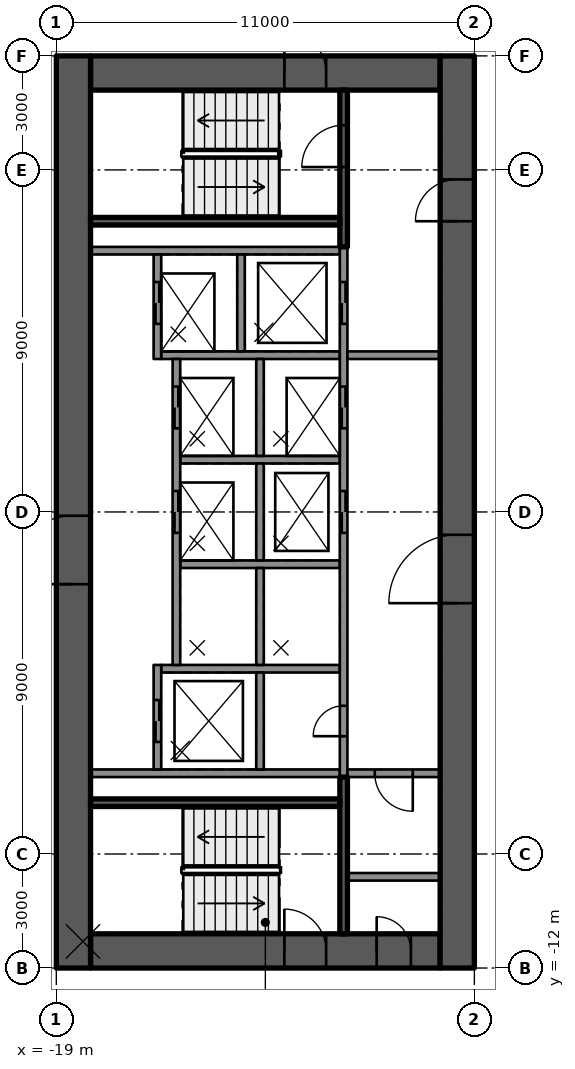
"""IFC4 building model, lengths in metres.
Left out: names, types, materials, properties, quantities, classifications, styles, units other than length and angle.
Written with IfcOpenShell. Run it as: python <this file> out.ifc"""

import sys

from ifc_helpers import new_model, si_unit, direction, frame, frame_2d, origin, place, context, subcontext, project, spatial, rectangle, extrude, element, fill, save


model = new_model("IFC4")
c1 = context("Model", 3, precision=1e-05, world=origin(), true_north=direction((0.0, 1.0)))
c2 = subcontext(c1, "Body", "Model", "MODEL_VIEW")
j1 = project(units=[si_unit("LENGTHUNIT", "METRE"), si_unit("PLANEANGLEUNIT", "RADIAN")], contexts=[c1])
p1 = place(None, origin())
s1 = spatial("IfcSite", under=j1, at=p1, CompositionType="ELEMENT")
p2 = place(p1, origin())
s2 = spatial("IfcBuilding", under=s1, at=p2, CompositionType="ELEMENT")
p3 = place(p2, frame((0.0, 0.0, 69.3)))
s3 = spatial("IfcBuildingStorey", under=s2, at=p3, CompositionType="ELEMENT", Elevation=69.3)
p4 = place(p3, frame((-18.1, 11.55, 0.0), z_axis=(0.0, 0.0, 1.0), x_axis=(1.0, 0.0, 0.0)))
e1 = element("IfcWall", 1, at=p4, inside=s3, PredefinedType="SHEAR", context=c2, shape_type="SweptSolid", body=[
    extrude(rectangle(XDim=9.2, YDim=0.9, at=frame_2d((4.6, 0.0))), origin(), (0.0, 0.0, 1.0), 3.5),
])
p5 = place(p4, frame((5.1, 0.0, 0.0)))
e2 = element("IfcOpeningElement", 2, at=p5, cuts=e1, PredefinedType="OPENING", context=c2, shape_type="SweptSolid", body=[
    extrude(rectangle(XDim=1.1, YDim=2.1, at=frame_2d((0.55, 1.05))), frame((0.0, 0.46, 0.0), z_axis=(0.0, -1.0, 0.0), x_axis=(1.0, 0.0, 0.0)), (0.0, 0.0, 1.0), 0.92),
])
p6 = place(p3, frame((-18.1, -11.55, 0.0), z_axis=(0.0, 0.0, 1.0), x_axis=(1.0, 0.0, 0.0)))
e3 = element("IfcWall", 3, at=p6, inside=s3, PredefinedType="SHEAR", context=c2, shape_type="SweptSolid", body=[
    extrude(rectangle(XDim=9.2, YDim=0.9, at=frame_2d((4.6, 0.0))), origin(), (0.0, 0.0, 1.0), 3.5),
])
p7 = place(p6, frame((5.1, 0.0, 0.0)))
e4 = element("IfcOpeningElement", 4, at=p7, cuts=e3, PredefinedType="OPENING", context=c2, shape_type="SweptSolid", body=[
    extrude(rectangle(XDim=1.1, YDim=2.1, at=frame_2d((0.55, 1.05))), frame((0.0, 0.46, 0.0), z_axis=(0.0, -1.0, 0.0), x_axis=(1.0, 0.0, 0.0)), (0.0, 0.0, 1.0), 0.92),
])
p8 = place(p6, frame((7.53, 0.0, 0.0)))
e5 = element("IfcOpeningElement", 5, at=p8, cuts=e3, PredefinedType="OPENING", context=c2, shape_type="SweptSolid", body=[
    extrude(rectangle(XDim=0.9, YDim=2.1, at=frame_2d((0.45, 1.05))), frame((0.0, 0.46, 0.0), z_axis=(0.0, -1.0, 0.0), x_axis=(1.0, 0.0, 0.0)), (0.0, 0.0, 1.0), 0.92),
])
p9 = place(p3, frame((-18.55, -12.0, 0.0), z_axis=(0.0, 0.0, 1.0), x_axis=(0.0, 1.0, 0.0)))
e6 = element("IfcWall", 6, at=p9, inside=s3, PredefinedType="SHEAR", context=c2, shape_type="SweptSolid", body=[
    extrude(rectangle(XDim=24.0, YDim=0.9, at=frame_2d((12.0, 0.0))), origin(), (0.0, 0.0, 1.0), 3.5),
])
p10 = place(p9, frame((10.1, 0.0, 0.0)))
e7 = element("IfcOpeningElement", 7, at=p10, cuts=e6, PredefinedType="OPENING", context=c2, shape_type="SweptSolid", body=[
    extrude(rectangle(XDim=1.8, YDim=2.1, at=frame_2d((0.9, 1.05))), frame((0.0, 0.46, 0.0), z_axis=(0.0, -1.0, 0.0), x_axis=(1.0, 0.0, 0.0)), (0.0, 0.0, 1.0), 0.92),
])
p11 = place(p3, frame((-8.45, -12.0, 0.0), z_axis=(0.0, 0.0, 1.0), x_axis=(0.0, 1.0, 0.0)))
e8 = element("IfcWall", 8, at=p11, inside=s3, PredefinedType="SHEAR", context=c2, shape_type="SweptSolid", body=[
    extrude(rectangle(XDim=24.0, YDim=0.9, at=frame_2d((12.0, 0.0))), origin(), (0.0, 0.0, 1.0), 3.5),
])
p12 = place(p11, frame((9.6, 0.0, 0.0)))
e9 = element("IfcOpeningElement", 9, at=p12, cuts=e8, PredefinedType="OPENING", context=c2, shape_type="SweptSolid", body=[
    extrude(rectangle(XDim=1.8, YDim=2.1, at=frame_2d((0.9, 1.05))), frame((0.0, 0.46, 0.0), z_axis=(0.0, -1.0, 0.0), x_axis=(1.0, 0.0, 0.0)), (0.0, 0.0, 1.0), 0.92),
])
p13 = place(p11, frame((19.65, 0.0, 0.0)))
e10 = element("IfcOpeningElement", 10, at=p13, cuts=e8, PredefinedType="OPENING", context=c2, shape_type="SweptSolid", body=[
    extrude(rectangle(XDim=1.1, YDim=2.1, at=frame_2d((0.55, 1.05))), frame((0.0, 0.46, 0.0), z_axis=(0.0, -1.0, 0.0), x_axis=(1.0, 0.0, 0.0)), (0.0, 0.0, 1.0), 0.92),
])
for number, where, z_axis, x_axis in (
    (11, (-11.54, 6.875, 0.0), (0.0, 0.0, 1.0), (-1.0, 0.0, 0.0)),
    (12, (-11.54, -6.875, 0.0), (0.0, 0.0, 1.0), (-1.0, 0.0, 0.0)),
):
    element("IfcWall", number, at=place(p3, frame(where, z_axis=z_axis, x_axis=x_axis)), inside=s3, PredefinedType="SOLIDWALL", context=c2, shape_type="SweptSolid", body=[
        extrude(rectangle(XDim=6.56, YDim=0.2, at=frame_2d((3.28, 0.0))), origin(), (0.0, 0.0, 1.0), 3.09),
    ])
p14 = place(p3, frame((-11.54, -4.125, 0.0), z_axis=(0.0, 0.0, 1.0), x_axis=(-1.0, 0.0, 0.0)))
e13 = element("IfcWall", 13, at=p14, inside=s3, PredefinedType="SOLIDWALL", context=c2, shape_type="SweptSolid", body=[
    extrude(rectangle(XDim=4.7, YDim=0.2, at=frame_2d((2.35, 0.0))), origin(), (0.0, 0.0, 1.0), 3.09),
])
for number, where, z_axis, x_axis in (
    (14, (-11.54, -1.375, 0.0), (0.0, 0.0, 1.0), (-1.0, 0.0, 0.0)),
    (15, (-11.54, 1.375, 0.0), (0.0, 0.0, 1.0), (-1.0, 0.0, 0.0)),
):
    element("IfcWall", number, at=place(p3, frame(where, z_axis=z_axis, x_axis=x_axis)), inside=s3, PredefinedType="SOLIDWALL", context=c2, shape_type="SweptSolid", body=[
        extrude(rectangle(XDim=4.2, YDim=0.2, at=frame_2d((2.1, 0.0))), origin(), (0.0, 0.0, 1.0), 3.09),
    ])
p15 = place(p3, frame((-11.54, 4.125, 0.0), z_axis=(0.0, 0.0, 1.0), x_axis=(-1.0, 0.0, 0.0)))
e16 = element("IfcWall", 16, at=p15, inside=s3, PredefinedType="SOLIDWALL", context=c2, shape_type="SweptSolid", body=[
    extrude(rectangle(XDim=4.7, YDim=0.2, at=frame_2d((2.35, 0.0))), origin(), (0.0, 0.0, 1.0), 3.09),
])
p16 = place(p3, frame((-11.44, -6.975, 0.0), z_axis=(0.0, 0.0, 1.0), x_axis=(0.0, 1.0, 0.0)))
e17 = element("IfcWall", 17, at=p16, inside=s3, PredefinedType="SOLIDWALL", context=c2, shape_type="SweptSolid", body=[
    extrude(rectangle(XDim=13.95, YDim=0.2, at=frame_2d((6.975, 0.0))), origin(), (0.0, 0.0, 1.0), 3.09),
])
p17 = place(p16, frame((6.425, 0.0, 0.0)))
e18 = element("IfcOpeningElement", 18, at=p17, cuts=e17, PredefinedType="OPENING", context=c2, shape_type="SweptSolid", body=[
    extrude(rectangle(XDim=1.1, YDim=2.1, at=frame_2d((0.55, 1.05))), frame((0.0, 0.11, 0.0), z_axis=(0.0, -1.0, 0.0), x_axis=(1.0, 0.0, 0.0)), (0.0, 0.0, 1.0), 0.22),
])
p18 = place(p16, frame((9.175, 0.0, 0.0)))
e19 = element("IfcOpeningElement", 19, at=p18, cuts=e17, PredefinedType="OPENING", context=c2, shape_type="SweptSolid", body=[
    extrude(rectangle(XDim=1.1, YDim=2.1, at=frame_2d((0.55, 1.05))), frame((0.0, 0.11, 0.0), z_axis=(0.0, -1.0, 0.0), x_axis=(1.0, 0.0, 0.0)), (0.0, 0.0, 1.0), 0.22),
])
p19 = place(p16, frame((11.925, 0.0, 0.0)))
e20 = element("IfcOpeningElement", 20, at=p19, cuts=e17, PredefinedType="OPENING", context=c2, shape_type="SweptSolid", body=[
    extrude(rectangle(XDim=1.1, YDim=2.1, at=frame_2d((0.55, 1.05))), frame((0.0, 0.11, 0.0), z_axis=(0.0, -1.0, 0.0), x_axis=(1.0, 0.0, 0.0)), (0.0, 0.0, 1.0), 0.22),
])
p20 = place(p16, frame((1.075, 0.0, 0.0)))
e21 = element("IfcOpeningElement", 21, at=p20, cuts=e17, PredefinedType="OPENING", context=c2, shape_type="SweptSolid", body=[
    extrude(rectangle(XDim=0.8, YDim=2.1, at=frame_2d((0.4, 1.05))), frame((0.0, 0.11, 0.0), z_axis=(0.0, -1.0, 0.0), x_axis=(1.0, 0.0, 0.0)), (0.0, 0.0, 1.0), 0.22),
])
for number, where, z_axis, x_axis in (
    (22, (-13.64, -6.775, 0.0), (0.0, 0.0, 1.0), (0.0, 1.0, 0.0)),
    (23, (-13.64, -4.025, 0.0), (0.0, 0.0, 1.0), (0.0, 1.0, 0.0)),
    (24, (-13.64, -1.275, 0.0), (0.0, 0.0, 1.0), (0.0, 1.0, 0.0)),
    (25, (-13.64, 1.475, 0.0), (0.0, 0.0, 1.0), (0.0, 1.0, 0.0)),
    (26, (-14.14, 4.225, 0.0), (0.0, 0.0, 1.0), (0.0, 1.0, 0.0)),
):
    element("IfcWall", number, at=place(p3, frame(where, z_axis=z_axis, x_axis=x_axis)), inside=s3, PredefinedType="SOLIDWALL", context=c2, shape_type="SweptSolid", body=[
        extrude(rectangle(XDim=2.55, YDim=0.2, at=frame_2d((1.275, 0.0))), origin(), (0.0, 0.0, 1.0), 3.09),
    ])
p21 = place(p3, frame((-16.34, -6.775, 0.0), z_axis=(0.0, 0.0, 1.0), x_axis=(0.0, 1.0, 0.0)))
e27 = element("IfcWall", 27, at=p21, inside=s3, PredefinedType="SOLIDWALL", context=c2, shape_type="SweptSolid", body=[
    extrude(rectangle(XDim=2.75, YDim=0.2, at=frame_2d((1.375, 0.0))), origin(), (0.0, 0.0, 1.0), 3.09),
])
p22 = place(p21, frame((0.725, 0.0, 0.0)))
e28 = element("IfcOpeningElement", 28, at=p22, cuts=e27, PredefinedType="OPENING", context=c2, shape_type="SweptSolid", body=[
    extrude(rectangle(XDim=1.1, YDim=2.1, at=frame_2d((0.55, 1.05))), frame((0.0, 0.11, 0.0), z_axis=(0.0, -1.0, 0.0), x_axis=(1.0, 0.0, 0.0)), (0.0, 0.0, 1.0), 0.22),
])
p23 = place(p3, frame((-15.84, -4.025, 0.0), z_axis=(0.0, 0.0, 1.0), x_axis=(0.0, 1.0, 0.0)))
e29 = element("IfcWall", 29, at=p23, inside=s3, PredefinedType="SOLIDWALL", context=c2, shape_type="SweptSolid", body=[
    extrude(rectangle(XDim=8.05, YDim=0.2, at=frame_2d((4.025, 0.0))), origin(), (0.0, 0.0, 1.0), 3.09),
])
p24 = place(p23, frame((3.475, 0.0, 0.0)))
e30 = element("IfcOpeningElement", 30, at=p24, cuts=e29, PredefinedType="OPENING", context=c2, shape_type="SweptSolid", body=[
    extrude(rectangle(XDim=1.1, YDim=2.1, at=frame_2d((0.55, 1.05))), frame((0.0, 0.11, 0.0), z_axis=(0.0, -1.0, 0.0), x_axis=(1.0, 0.0, 0.0)), (0.0, 0.0, 1.0), 0.22),
])
p25 = place(p23, frame((6.225, 0.0, 0.0)))
e31 = element("IfcOpeningElement", 31, at=p25, cuts=e29, PredefinedType="OPENING", context=c2, shape_type="SweptSolid", body=[
    extrude(rectangle(XDim=1.1, YDim=2.1, at=frame_2d((0.55, 1.05))), frame((0.0, 0.11, 0.0), z_axis=(0.0, -1.0, 0.0), x_axis=(1.0, 0.0, 0.0)), (0.0, 0.0, 1.0), 0.22),
])
p26 = place(p3, frame((-16.34, 4.025, 0.0), z_axis=(0.0, 0.0, 1.0), x_axis=(0.0, 1.0, 0.0)))
e32 = element("IfcWall", 32, at=p26, inside=s3, PredefinedType="SOLIDWALL", context=c2, shape_type="SweptSolid", body=[
    extrude(rectangle(XDim=2.75, YDim=0.2, at=frame_2d((1.375, 0.0))), origin(), (0.0, 0.0, 1.0), 3.09),
])
p27 = place(p26, frame((0.925, 0.0, 0.0)))
e33 = element("IfcOpeningElement", 33, at=p27, cuts=e32, PredefinedType="OPENING", context=c2, shape_type="SweptSolid", body=[
    extrude(rectangle(XDim=1.1, YDim=2.1, at=frame_2d((0.55, 1.05))), frame((0.0, 0.11, 0.0), z_axis=(0.0, -1.0, 0.0), x_axis=(1.0, 0.0, 0.0)), (0.0, 0.0, 1.0), 0.22),
])
p28 = place(p3, frame((-11.44, 6.975, 0.0), z_axis=(0.0, 0.0, 1.0), x_axis=(0.0, 1.0, 0.0)))
e34 = element("IfcWall", 34, at=p28, inside=s3, PredefinedType="SOLIDWALL", context=c2, shape_type="SweptSolid", body=[
    extrude(rectangle(XDim=4.125, YDim=0.2, at=frame_2d((2.062, 0.0))), origin(), (0.0, 0.0, 1.0), 3.09),
])
p29 = place(p28, frame((2.1, 0.0, 0.0)))
e35 = element("IfcOpeningElement", 35, at=p29, cuts=e34, PredefinedType="OPENING", context=c2, shape_type="SweptSolid", body=[
    extrude(rectangle(XDim=1.1, YDim=2.1, at=frame_2d((0.55, 1.05))), frame((0.0, 0.11, 0.0), z_axis=(0.0, -1.0, 0.0), x_axis=(1.0, 0.0, 0.0)), (0.0, 0.0, 1.0), 0.22),
])
p30 = place(p3, frame((-11.54, 7.65, 0.0), z_axis=(0.0, 0.0, 1.0), x_axis=(-1.0, 0.0, 0.0)))
e36 = element("IfcWall", 36, at=p30, inside=s3, PredefinedType="SOLIDWALL", context=c2, shape_type="SweptSolid", body=[
    extrude(rectangle(XDim=6.56, YDim=0.2, at=frame_2d((3.28, 0.0))), origin(), (0.0, 0.0, 1.0), 3.09),
])
p31 = place(p3, frame((-11.44, -11.1, 0.0), z_axis=(0.0, 0.0, 1.0), x_axis=(0.0, 1.0, 0.0)))
e37 = element("IfcWall", 37, at=p31, inside=s3, PredefinedType="SOLIDWALL", context=c2, shape_type="SweptSolid", body=[
    extrude(rectangle(XDim=4.125, YDim=0.2, at=frame_2d((2.062, 0.0))), origin(), (0.0, 0.0, 1.0), 3.09),
])
p32 = place(p3, frame((-11.54, -7.65, 0.0), z_axis=(0.0, 0.0, 1.0), x_axis=(-1.0, 0.0, 0.0)))
e38 = element("IfcWall", 38, at=p32, inside=s3, PredefinedType="SOLIDWALL", context=c2, shape_type="SweptSolid", body=[
    extrude(rectangle(XDim=6.56, YDim=0.2, at=frame_2d((3.28, 0.0))), origin(), (0.0, 0.0, 1.0), 3.09),
])
p33 = place(p3, frame((-8.9, 4.125, 0.0), z_axis=(0.0, 0.0, 1.0), x_axis=(-1.0, 0.0, 0.0)))
e39 = element("IfcWall", 39, at=p33, inside=s3, PredefinedType="PARTITIONING", context=c2, shape_type="SweptSolid", body=[
    extrude(rectangle(XDim=2.44, YDim=0.2, at=frame_2d((1.22, 0.0))), origin(), (0.0, 0.0, 1.0), 3.09),
])
p34 = place(p3, frame((-8.9, -6.875, 0.0), z_axis=(0.0, 0.0, 1.0), x_axis=(-1.0, 0.0, 0.0)))
e40 = element("IfcWall", 40, at=p34, inside=s3, PredefinedType="PARTITIONING", context=c2, shape_type="SweptSolid", body=[
    extrude(rectangle(XDim=2.44, YDim=0.2, at=frame_2d((1.22, 0.0))), origin(), (0.0, 0.0, 1.0), 3.09),
])
p35 = place(p34, frame((0.72, 0.0, 0.0)))
e41 = element("IfcOpeningElement", 41, at=p35, cuts=e40, PredefinedType="OPENING", context=c2, shape_type="SweptSolid", body=[
    extrude(rectangle(XDim=1.0, YDim=2.1, at=frame_2d((0.5, 1.05))), frame((0.0, 0.11, 0.0), z_axis=(0.0, -1.0, 0.0), x_axis=(1.0, 0.0, 0.0)), (0.0, 0.0, 1.0), 0.22),
])
p36 = place(p3, frame((-8.9, -9.6, 0.0), z_axis=(0.0, 0.0, 1.0), x_axis=(-1.0, 0.0, 0.0)))
e42 = element("IfcWall", 42, at=p36, inside=s3, PredefinedType="PARTITIONING", context=c2, shape_type="SweptSolid", body=[
    extrude(rectangle(XDim=2.44, YDim=0.2, at=frame_2d((1.22, 0.0))), origin(), (0.0, 0.0, 1.0), 3.09),
])
p37 = place(p22, origin())
e43 = element("IfcDoor", 43, at=p37, inside=s3, OperationType="DOUBLE_DOOR_SLIDING", PredefinedType="DOOR", context=c2, shape_type="SweptSolid", body=[
    extrude(rectangle(XDim=1.1, YDim=2.1, at=frame_2d((0.55, 1.05))), frame((0.0, 0.025, 0.0), z_axis=(0.0, -1.0, 0.0), x_axis=(1.0, 0.0, 0.0)), (0.0, 0.0, 1.0), 0.05),
])
fill(e28, e43)
p38 = place(p17, origin())
e44 = element("IfcDoor", 44, at=p38, inside=s3, OperationType="DOUBLE_DOOR_SLIDING", PredefinedType="DOOR", context=c2, shape_type="SweptSolid", body=[
    extrude(rectangle(XDim=1.1, YDim=2.1, at=frame_2d((0.55, 1.05))), frame((0.0, 0.025, 0.0), z_axis=(0.0, -1.0, 0.0), x_axis=(1.0, 0.0, 0.0)), (0.0, 0.0, 1.0), 0.05),
])
fill(e18, e44)
p39 = place(p24, origin())
e45 = element("IfcDoor", 45, at=p39, inside=s3, OperationType="DOUBLE_DOOR_SLIDING", PredefinedType="DOOR", context=c2, shape_type="SweptSolid", body=[
    extrude(rectangle(XDim=1.1, YDim=2.1, at=frame_2d((0.55, 1.05))), frame((0.0, 0.025, 0.0), z_axis=(0.0, -1.0, 0.0), x_axis=(1.0, 0.0, 0.0)), (0.0, 0.0, 1.0), 0.05),
])
fill(e30, e45)
p40 = place(p18, origin())
e46 = element("IfcDoor", 46, at=p40, inside=s3, OperationType="DOUBLE_DOOR_SLIDING", PredefinedType="DOOR", context=c2, shape_type="SweptSolid", body=[
    extrude(rectangle(XDim=1.1, YDim=2.1, at=frame_2d((0.55, 1.05))), frame((0.0, 0.025, 0.0), z_axis=(0.0, -1.0, 0.0), x_axis=(1.0, 0.0, 0.0)), (0.0, 0.0, 1.0), 0.05),
])
fill(e19, e46)
p41 = place(p25, origin())
e47 = element("IfcDoor", 47, at=p41, inside=s3, OperationType="DOUBLE_DOOR_SLIDING", PredefinedType="DOOR", context=c2, shape_type="SweptSolid", body=[
    extrude(rectangle(XDim=1.1, YDim=2.1, at=frame_2d((0.55, 1.05))), frame((0.0, 0.025, 0.0), z_axis=(0.0, -1.0, 0.0), x_axis=(1.0, 0.0, 0.0)), (0.0, 0.0, 1.0), 0.05),
])
fill(e31, e47)
p42 = place(p19, origin())
e48 = element("IfcDoor", 48, at=p42, inside=s3, OperationType="DOUBLE_DOOR_SLIDING", PredefinedType="DOOR", context=c2, shape_type="SweptSolid", body=[
    extrude(rectangle(XDim=1.1, YDim=2.1, at=frame_2d((0.55, 1.05))), frame((0.0, 0.025, 0.0), z_axis=(0.0, -1.0, 0.0), x_axis=(1.0, 0.0, 0.0)), (0.0, 0.0, 1.0), 0.05),
])
fill(e20, e48)
p43 = place(p27, origin())
e49 = element("IfcDoor", 49, at=p43, inside=s3, OperationType="DOUBLE_DOOR_SLIDING", PredefinedType="DOOR", context=c2, shape_type="SweptSolid", body=[
    extrude(rectangle(XDim=1.1, YDim=2.1, at=frame_2d((0.55, 1.05))), frame((0.0, 0.025, 0.0), z_axis=(0.0, -1.0, 0.0), x_axis=(1.0, 0.0, 0.0)), (0.0, 0.0, 1.0), 0.05),
])
fill(e33, e49)
p44 = place(p20, origin())
e50 = element("IfcDoor", 50, at=p44, inside=s3, OperationType="SINGLE_SWING_LEFT", PredefinedType="DOOR", context=c2, shape_type="SweptSolid", body=[
    extrude(rectangle(XDim=0.8, YDim=2.1, at=frame_2d((0.4, 1.05))), frame((0.0, 0.025, 0.0), z_axis=(0.0, -1.0, 0.0), x_axis=(1.0, 0.0, 0.0)), (0.0, 0.0, 1.0), 0.05),
])
fill(e21, e50)
p45 = place(p12, origin())
e51 = element("IfcDoor", 51, at=p45, inside=s3, OperationType="SINGLE_SWING_LEFT", PredefinedType="DOOR", context=c2, shape_type="SweptSolid", body=[
    extrude(rectangle(XDim=1.8, YDim=2.1, at=frame_2d((0.9, 1.05))), frame((0.0, 0.025, 0.0), z_axis=(0.0, -1.0, 0.0), x_axis=(1.0, 0.0, 0.0)), (0.0, 0.0, 1.0), 0.05),
])
fill(e9, e51)
p46 = place(p10, origin())
e52 = element("IfcDoor", 52, at=p46, inside=s3, OperationType="SINGLE_SWING_LEFT", PredefinedType="DOOR", context=c2, shape_type="SweptSolid", body=[
    extrude(rectangle(XDim=1.8, YDim=2.1, at=frame_2d((0.9, 1.05))), frame((0.0, 0.025, 0.0), z_axis=(0.0, -1.0, 0.0), x_axis=(1.0, 0.0, 0.0)), (0.0, 0.0, 1.0), 0.05),
])
fill(e7, e52)
p47 = place(p13, origin())
e53 = element("IfcDoor", 53, at=p47, inside=s3, OperationType="SINGLE_SWING_RIGHT", PredefinedType="DOOR", context=c2, shape_type="SweptSolid", body=[
    extrude(rectangle(XDim=1.1, YDim=2.1, at=frame_2d((0.55, 1.05))), frame((0.0, 0.025, 0.0), z_axis=(0.0, -1.0, 0.0), x_axis=(1.0, 0.0, 0.0)), (0.0, 0.0, 1.0), 0.05),
])
fill(e10, e53)
p48 = place(p5, origin())
e54 = element("IfcDoor", 54, at=p48, inside=s3, OperationType="SINGLE_SWING_RIGHT", PredefinedType="DOOR", context=c2, shape_type="SweptSolid", body=[
    extrude(rectangle(XDim=1.1, YDim=2.1, at=frame_2d((0.55, 1.05))), frame((0.0, 0.025, 0.0), z_axis=(0.0, -1.0, 0.0), x_axis=(1.0, 0.0, 0.0)), (0.0, 0.0, 1.0), 0.05),
])
fill(e2, e54)
p49 = place(p7, origin())
e55 = element("IfcDoor", 55, at=p49, inside=s3, OperationType="SINGLE_SWING_RIGHT", PredefinedType="DOOR", context=c2, shape_type="SweptSolid", body=[
    extrude(rectangle(XDim=1.1, YDim=2.1, at=frame_2d((0.55, 1.05))), frame((0.0, 0.025, 0.0), z_axis=(0.0, -1.0, 0.0), x_axis=(1.0, 0.0, 0.0)), (0.0, 0.0, 1.0), 0.05),
])
fill(e4, e55)
p50 = place(p29, origin())
e56 = element("IfcDoor", 56, at=p50, inside=s3, OperationType="SINGLE_SWING_RIGHT", PredefinedType="DOOR", context=c2, shape_type="SweptSolid", body=[
    extrude(rectangle(XDim=1.1, YDim=2.1, at=frame_2d((0.55, 1.05))), frame((0.0, 0.025, 0.0), z_axis=(0.0, -1.0, 0.0), x_axis=(1.0, 0.0, 0.0)), (0.0, 0.0, 1.0), 0.05),
])
fill(e35, e56)
p51 = place(p8, origin())
e57 = element("IfcDoor", 57, at=p51, inside=s3, OperationType="SINGLE_SWING_RIGHT", PredefinedType="DOOR", context=c2, shape_type="SweptSolid", body=[
    extrude(rectangle(XDim=0.9, YDim=2.1, at=frame_2d((0.45, 1.05))), frame((0.0, 0.025, 0.0), z_axis=(0.0, -1.0, 0.0), x_axis=(1.0, 0.0, 0.0)), (0.0, 0.0, 1.0), 0.05),
])
fill(e5, e57)
p52 = place(p35, origin())
e58 = element("IfcDoor", 58, at=p52, inside=s3, OperationType="SINGLE_SWING_RIGHT", PredefinedType="DOOR", context=c2, shape_type="SweptSolid", body=[
    extrude(rectangle(XDim=1.0, YDim=2.1, at=frame_2d((0.5, 1.05))), frame((0.0, 0.025, 0.0), z_axis=(0.0, -1.0, 0.0), x_axis=(1.0, 0.0, 0.0)), (0.0, 0.0, 1.0), 0.05),
])
fill(e41, e58)
save(model, sys.argv[1])
